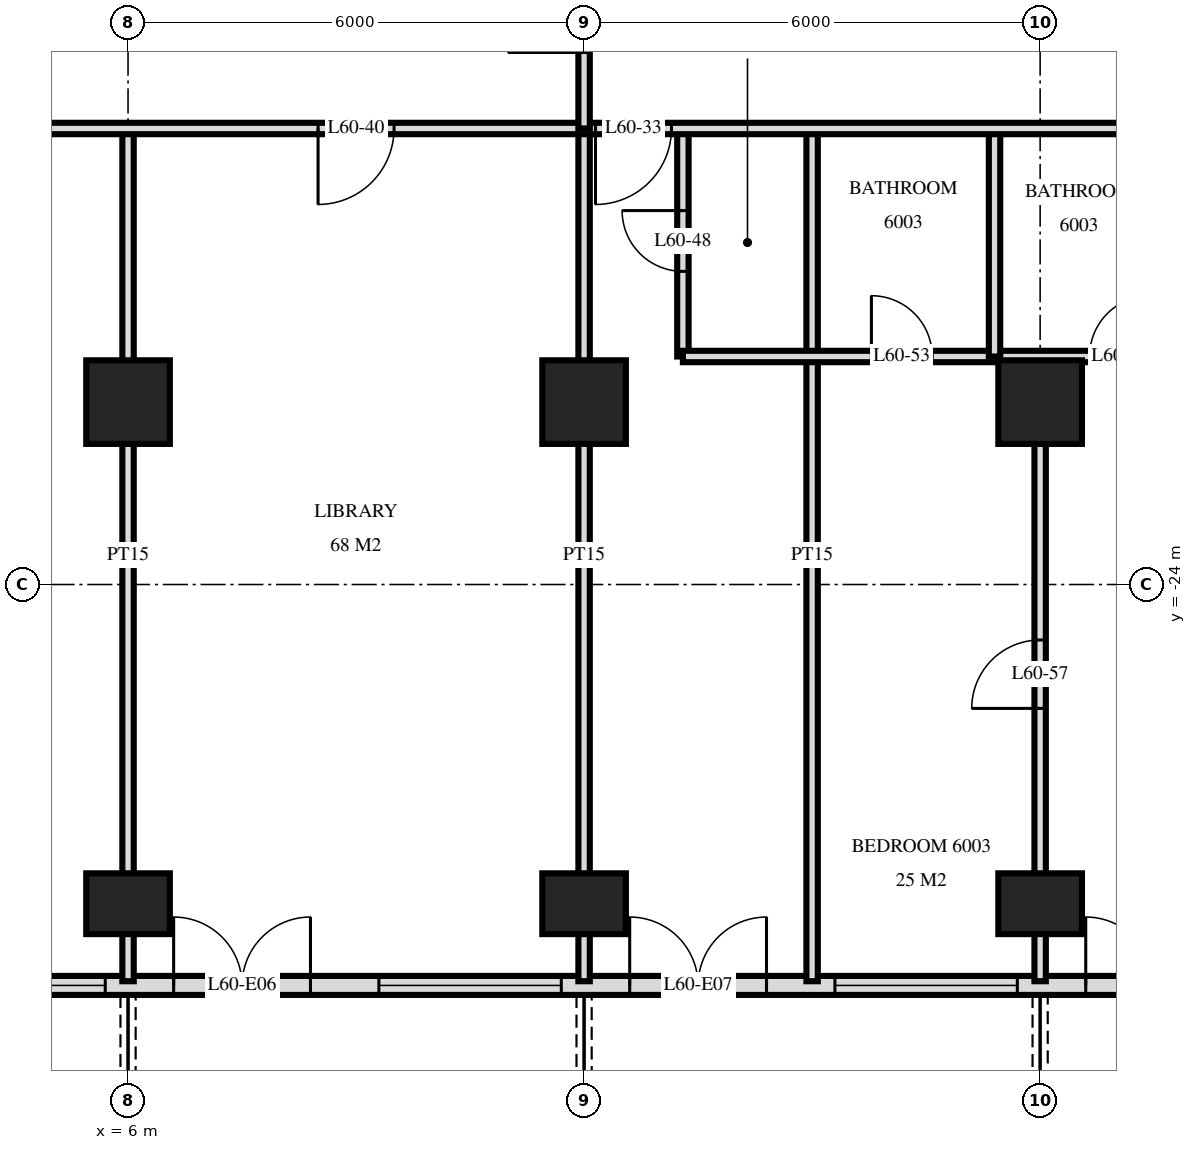
"""IFC4 building model, lengths in metres.
Left out: names, types, materials, properties, quantities, classifications, styles, units other than length and angle.
Written with IfcOpenShell. Run it as: python <this file> out.ifc"""

import sys

from ifc_helpers import new_model, si_unit, direction, frame, frame_2d, origin, origin_2d, place, context, subcontext, project, spatial, rectangle, extrude, element, fill, save


model = new_model("IFC4")
c1 = context("Model", 3, precision=1e-05, world=origin(), true_north=direction((0.0, 1.0)))
c2 = subcontext(c1, "Body", "Model", "MODEL_VIEW")
j1 = project(units=[si_unit("LENGTHUNIT", "METRE"), si_unit("PLANEANGLEUNIT", "RADIAN")], contexts=[c1])
p1 = place(None, origin())
s1 = spatial("IfcSite", under=j1, at=p1, CompositionType="ELEMENT")
p2 = place(p1, origin())
s2 = spatial("IfcBuilding", under=s1, at=p2, CompositionType="ELEMENT")
p3 = place(p2, frame((0.0, 0.0, 229.1)))
s3 = spatial("IfcBuildingStorey", under=s2, at=p3, CompositionType="ELEMENT", Elevation=229.1)
p4 = place(p3, frame((6.0, -28.2, 0.0), z_axis=(0.0, 0.0, 1.0), x_axis=(1.0, 0.0, 0.0)))
e1 = element("IfcColumn", 1, at=p4, inside=s3, PredefinedType="COLUMN", context=c2, shape_type="SweptSolid", body=[
    extrude(rectangle(XDim=1.1, YDim=0.8, at=origin_2d()), origin(), (0.0, 0.0, 1.0), 3.5),
])
p5 = place(p3, frame((6.0, -21.6, 0.0), z_axis=(0.0, 0.0, 1.0), x_axis=(1.0, 0.0, 0.0)))
e2 = element("IfcColumn", 2, at=p5, inside=s3, PredefinedType="COLUMN", context=c2, shape_type="SweptSolid", body=[
    extrude(rectangle(XDim=1.1, YDim=1.1, at=origin_2d()), origin(), (0.0, 0.0, 1.0), 3.5),
])
p6 = place(p3, frame((12.0, -28.2, 0.0), z_axis=(0.0, 0.0, 1.0), x_axis=(1.0, 0.0, 0.0)))
e3 = element("IfcColumn", 3, at=p6, inside=s3, PredefinedType="COLUMN", context=c2, shape_type="SweptSolid", body=[
    extrude(rectangle(XDim=1.1, YDim=0.8, at=origin_2d()), origin(), (0.0, 0.0, 1.0), 3.5),
])
p7 = place(p3, frame((12.0, -21.6, 0.0), z_axis=(0.0, 0.0, 1.0), x_axis=(1.0, 0.0, 0.0)))
e4 = element("IfcColumn", 4, at=p7, inside=s3, PredefinedType="COLUMN", context=c2, shape_type="SweptSolid", body=[
    extrude(rectangle(XDim=1.1, YDim=1.1, at=origin_2d()), origin(), (0.0, 0.0, 1.0), 3.5),
])
p8 = place(p3, frame((18.0, -28.2, 0.0), z_axis=(0.0, 0.0, 1.0), x_axis=(1.0, 0.0, 0.0)))
e5 = element("IfcColumn", 5, at=p8, inside=s3, PredefinedType="COLUMN", context=c2, shape_type="SweptSolid", body=[
    extrude(rectangle(XDim=1.1, YDim=0.8, at=origin_2d()), origin(), (0.0, 0.0, 1.0), 3.5),
])
p9 = place(p3, frame((18.0, -21.6, 0.0), z_axis=(0.0, 0.0, 1.0), x_axis=(1.0, 0.0, 0.0)))
e6 = element("IfcColumn", 6, at=p9, inside=s3, PredefinedType="COLUMN", context=c2, shape_type="SweptSolid", body=[
    extrude(rectangle(XDim=1.1, YDim=1.1, at=origin_2d()), origin(), (0.0, 0.0, 1.0), 3.5),
])
p10 = place(p3, frame((-22.475, -29.275, 0.0), z_axis=(0.0, 0.0, 1.0), x_axis=(1.0, 0.0, 0.0)))
e7 = element("IfcWall", 7, at=p10, inside=s3, PredefinedType="SOLIDWALL", context=c2, shape_type="SweptSolid", body=[
    extrude(rectangle(XDim=44.951, YDim=0.25, at=frame_2d((22.475, 0.0))), origin(), (0.0, 0.0, 1.0), 3.22),
])
p11 = place(p10, frame((0.575, 0.0, 0.0)))
e8 = element("IfcOpeningElement", 8, at=p11, cuts=e7, PredefinedType="OPENING", context=c2, shape_type="SweptSolid", body=[
    extrude(rectangle(XDim=1.8, YDim=2.4, at=frame_2d((0.9, 1.2))), frame((0.0, 0.135, 0.0), z_axis=(0.0, -1.0, 0.0), x_axis=(1.0, 0.0, 0.0)), (0.0, 0.0, 1.0), 0.27),
])
p12 = place(p10, frame((6.575, 0.0, 0.0)))
e9 = element("IfcOpeningElement", 9, at=p12, cuts=e7, PredefinedType="OPENING", context=c2, shape_type="SweptSolid", body=[
    extrude(rectangle(XDim=1.8, YDim=2.4, at=frame_2d((0.9, 1.2))), frame((0.0, 0.135, 0.0), z_axis=(0.0, -1.0, 0.0), x_axis=(1.0, 0.0, 0.0)), (0.0, 0.0, 1.0), 0.27),
])
p13 = place(p10, frame((11.075, 0.0, 0.0)))
e10 = element("IfcOpeningElement", 10, at=p13, cuts=e7, PredefinedType="OPENING", context=c2, shape_type="SweptSolid", body=[
    extrude(rectangle(XDim=1.8, YDim=2.4, at=frame_2d((0.9, 1.2))), frame((0.0, 0.135, 0.0), z_axis=(0.0, -1.0, 0.0), x_axis=(1.0, 0.0, 0.0)), (0.0, 0.0, 1.0), 0.27),
])
p14 = place(p10, frame((13.775, 0.0, 0.9)))
e11 = element("IfcOpeningElement", 11, at=p14, cuts=e7, PredefinedType="OPENING", context=c2, shape_type="SweptSolid", body=[
    extrude(rectangle(XDim=2.4, YDim=1.5, at=frame_2d((1.2, 0.75))), frame((0.0, 0.135, 0.0), z_axis=(0.0, -1.0, 0.0), x_axis=(1.0, 0.0, 0.0)), (0.0, 0.0, 1.0), 0.27),
])
p15 = place(p10, frame((16.775, 0.0, 0.9)))
e12 = element("IfcOpeningElement", 12, at=p15, cuts=e7, PredefinedType="OPENING", context=c2, shape_type="SweptSolid", body=[
    extrude(rectangle(XDim=2.4, YDim=1.5, at=frame_2d((1.2, 0.75))), frame((0.0, 0.135, 0.0), z_axis=(0.0, -1.0, 0.0), x_axis=(1.0, 0.0, 0.0)), (0.0, 0.0, 1.0), 0.27),
])
p16 = place(p10, frame((20.075, 0.0, 0.0)))
e13 = element("IfcOpeningElement", 13, at=p16, cuts=e7, PredefinedType="OPENING", context=c2, shape_type="SweptSolid", body=[
    extrude(rectangle(XDim=1.8, YDim=2.4, at=frame_2d((0.9, 1.2))), frame((0.0, 0.135, 0.0), z_axis=(0.0, -1.0, 0.0), x_axis=(1.0, 0.0, 0.0)), (0.0, 0.0, 1.0), 0.27),
])
p17 = place(p10, frame((23.075, 0.0, 0.0)))
e14 = element("IfcOpeningElement", 14, at=p17, cuts=e7, PredefinedType="OPENING", context=c2, shape_type="SweptSolid", body=[
    extrude(rectangle(XDim=1.8, YDim=2.4, at=frame_2d((0.9, 1.2))), frame((0.0, 0.135, 0.0), z_axis=(0.0, -1.0, 0.0), x_axis=(1.0, 0.0, 0.0)), (0.0, 0.0, 1.0), 0.27),
])
p18 = place(p10, frame((25.775, 0.0, 0.9)))
e15 = element("IfcOpeningElement", 15, at=p18, cuts=e7, PredefinedType="OPENING", context=c2, shape_type="SweptSolid", body=[
    extrude(rectangle(XDim=2.4, YDim=1.5, at=frame_2d((1.2, 0.75))), frame((0.0, 0.135, 0.0), z_axis=(0.0, -1.0, 0.0), x_axis=(1.0, 0.0, 0.0)), (0.0, 0.0, 1.0), 0.27),
])
p19 = place(p10, frame((29.075, 0.0, 0.0)))
e16 = element("IfcOpeningElement", 16, at=p19, cuts=e7, PredefinedType="OPENING", context=c2, shape_type="SweptSolid", body=[
    extrude(rectangle(XDim=1.8, YDim=2.4, at=frame_2d((0.9, 1.2))), frame((0.0, 0.135, 0.0), z_axis=(0.0, -1.0, 0.0), x_axis=(1.0, 0.0, 0.0)), (0.0, 0.0, 1.0), 0.27),
])
p20 = place(p10, frame((31.775, 0.0, 0.9)))
e17 = element("IfcOpeningElement", 17, at=p20, cuts=e7, PredefinedType="OPENING", context=c2, shape_type="SweptSolid", body=[
    extrude(rectangle(XDim=2.4, YDim=1.5, at=frame_2d((1.2, 0.75))), frame((0.0, 0.135, 0.0), z_axis=(0.0, -1.0, 0.0), x_axis=(1.0, 0.0, 0.0)), (0.0, 0.0, 1.0), 0.27),
])
p21 = place(p10, frame((35.075, 0.0, 0.0)))
e18 = element("IfcOpeningElement", 18, at=p21, cuts=e7, PredefinedType="OPENING", context=c2, shape_type="SweptSolid", body=[
    extrude(rectangle(XDim=1.8, YDim=2.4, at=frame_2d((0.9, 1.2))), frame((0.0, 0.135, 0.0), z_axis=(0.0, -1.0, 0.0), x_axis=(1.0, 0.0, 0.0)), (0.0, 0.0, 1.0), 0.27),
])
p22 = place(p10, frame((37.775, 0.0, 0.9)))
e19 = element("IfcOpeningElement", 19, at=p22, cuts=e7, PredefinedType="OPENING", context=c2, shape_type="SweptSolid", body=[
    extrude(rectangle(XDim=2.4, YDim=1.5, at=frame_2d((1.2, 0.75))), frame((0.0, 0.135, 0.0), z_axis=(0.0, -1.0, 0.0), x_axis=(1.0, 0.0, 0.0)), (0.0, 0.0, 1.0), 0.27),
])
p23 = place(p10, frame((41.075, 0.0, 0.0)))
e20 = element("IfcOpeningElement", 20, at=p23, cuts=e7, PredefinedType="OPENING", context=c2, shape_type="SweptSolid", body=[
    extrude(rectangle(XDim=1.8, YDim=2.4, at=frame_2d((0.9, 1.2))), frame((0.0, 0.135, 0.0), z_axis=(0.0, -1.0, 0.0), x_axis=(1.0, 0.0, 0.0)), (0.0, 0.0, 1.0), 0.27),
])
p24 = place(p3, frame((18.0, -29.22, 0.0), z_axis=(0.0, 0.0, 1.0), x_axis=(0.0, 1.0, 0.0)))
e21 = element("IfcWall", 21, at=p24, inside=s3, PredefinedType="PARTITIONING", context=c2, shape_type="SweptSolid", body=[
    extrude(rectangle(XDim=8.22, YDim=0.15, at=frame_2d((4.11, 0.0))), origin(), (0.0, 0.0, 1.0), 3.22),
])
p25 = place(p24, frame((3.59, 0.0, 0.0)))
e22 = element("IfcOpeningElement", 22, at=p25, cuts=e21, PredefinedType="OPENING", context=c2, shape_type="SweptSolid", body=[
    extrude(rectangle(XDim=0.9, YDim=2.1, at=frame_2d((0.45, 1.05))), frame((0.0, 0.085, 0.0), z_axis=(0.0, -1.0, 0.0), x_axis=(1.0, 0.0, 0.0)), (0.0, 0.0, 1.0), 0.17),
])
p26 = place(p3, frame((17.4, -21.0, 0.0), z_axis=(0.0, 0.0, 1.0), x_axis=(0.0, 1.0, 0.0)))
e23 = element("IfcWall", 23, at=p26, inside=s3, PredefinedType="PARTITIONING", context=c2, shape_type="SweptSolid", body=[
    extrude(rectangle(XDim=3.0, YDim=0.15, at=frame_2d((1.5, 0.0))), origin(), (0.0, 0.0, 1.0), 3.22),
])
p27 = place(p3, frame((15.0, -29.22, 0.0), z_axis=(0.0, 0.0, 1.0), x_axis=(0.0, 1.0, 0.0)))
e24 = element("IfcWall", 24, at=p27, inside=s3, PredefinedType="PARTITIONING", context=c2, shape_type="SweptSolid", body=[
    extrude(rectangle(XDim=11.22, YDim=0.15, at=frame_2d((5.61, 0.0))), origin(), (0.0, 0.0, 1.0), 3.22),
])
p28 = place(p3, frame((13.3, -21.0, 0.0), z_axis=(0.0, 0.0, 1.0), x_axis=(0.0, 1.0, 0.0)))
e25 = element("IfcWall", 25, at=p28, inside=s3, PredefinedType="PARTITIONING", context=c2, shape_type="SweptSolid", body=[
    extrude(rectangle(XDim=3.0, YDim=0.15, at=frame_2d((1.5, 0.0))), origin(), (0.0, 0.0, 1.0), 3.22),
])
p29 = place(p28, frame((1.12, 0.0, 0.0)))
e26 = element("IfcOpeningElement", 26, at=p29, cuts=e25, PredefinedType="OPENING", context=c2, shape_type="SweptSolid", body=[
    extrude(rectangle(XDim=0.8, YDim=2.1, at=frame_2d((0.4, 1.05))), frame((0.0, 0.085, 0.0), z_axis=(0.0, -1.0, 0.0), x_axis=(1.0, 0.0, 0.0)), (0.0, 0.0, 1.0), 0.17),
])
p30 = place(p3, frame((12.0, -18.0, 0.0), z_axis=(0.0, 0.0, 1.0), x_axis=(0.0, 1.0, 0.0)))
e27 = element("IfcWall", 27, at=p30, inside=s3, PredefinedType="PARTITIONING", context=c2, shape_type="SweptSolid", body=[
    extrude(rectangle(XDim=2.95, YDim=0.15, at=frame_2d((1.475, 0.0))), origin(), (0.0, 0.0, 1.0), 3.22),
])
p31 = place(p30, frame((1.0, 0.0, 0.0)))
e28 = element("IfcOpeningElement", 28, at=p31, cuts=e27, PredefinedType="OPENING", context=c2, shape_type="SweptSolid", body=[
    extrude(rectangle(XDim=1.0, YDim=2.1, at=frame_2d((0.5, 1.05))), frame((0.0, 0.085, 0.0), z_axis=(0.0, -1.0, 0.0), x_axis=(1.0, 0.0, 0.0)), (0.0, 0.0, 1.0), 0.17),
])
for number, where, z_axis, x_axis in (
    (29, (12.0, -29.22, 0.0), (0.0, 0.0, 1.0), (0.0, 1.0, 0.0)),
    (30, (6.0, -29.22, 0.0), (0.0, 0.0, 1.0), (0.0, 1.0, 0.0)),
):
    element("IfcWall", number, at=place(p3, frame(where, z_axis=z_axis, x_axis=x_axis)), inside=s3, PredefinedType="PARTITIONING", context=c2, shape_type="SweptSolid", body=[
        extrude(rectangle(XDim=11.22, YDim=0.15, at=frame_2d((5.61, 0.0))), origin(), (0.0, 0.0, 1.0), 3.22),
    ])
p32 = place(p3, frame((13.3, -21.0, 0.0), z_axis=(0.0, 0.0, 1.0), x_axis=(1.0, 0.0, 0.0)))
e31 = element("IfcWall", 31, at=p32, inside=s3, PredefinedType="PARTITIONING", context=c2, shape_type="SweptSolid", body=[
    extrude(rectangle(XDim=8.1, YDim=0.15, at=frame_2d((4.05, 0.0))), origin(), (0.0, 0.0, 1.0), 3.22),
])
p33 = place(p32, frame((2.48, 0.0, 0.0)))
e32 = element("IfcOpeningElement", 32, at=p33, cuts=e31, PredefinedType="OPENING", context=c2, shape_type="SweptSolid", body=[
    extrude(rectangle(XDim=0.8, YDim=2.1, at=frame_2d((0.4, 1.05))), frame((0.0, 0.085, 0.0), z_axis=(0.0, -1.0, 0.0), x_axis=(1.0, 0.0, 0.0)), (0.0, 0.0, 1.0), 0.17),
])
p34 = place(p32, frame((5.35, 0.0, 0.0)))
e33 = element("IfcOpeningElement", 33, at=p34, cuts=e31, PredefinedType="OPENING", context=c2, shape_type="SweptSolid", body=[
    extrude(rectangle(XDim=0.8, YDim=2.1, at=frame_2d((0.4, 1.05))), frame((0.0, 0.085, 0.0), z_axis=(0.0, -1.0, 0.0), x_axis=(1.0, 0.0, 0.0)), (0.0, 0.0, 1.0), 0.17),
])
p35 = place(p3, frame((-26.82, -18.0, 0.0), z_axis=(0.0, 0.0, 1.0), x_axis=(1.0, 0.0, 0.0)))
e34 = element("IfcWall", 34, at=p35, inside=s3, PredefinedType="PARTITIONING", context=c2, shape_type="SweptSolid", body=[
    extrude(rectangle(XDim=53.64, YDim=0.15, at=frame_2d((26.82, 0.0))), origin(), (0.0, 0.0, 1.0), 3.22),
])
p36 = place(p35, frame((11.32, 0.0, 0.0)))
e35 = element("IfcOpeningElement", 35, at=p36, cuts=e34, PredefinedType="OPENING", context=c2, shape_type="SweptSolid", body=[
    extrude(rectangle(XDim=1.0, YDim=2.1, at=frame_2d((0.5, 1.05))), frame((0.0, 0.085, 0.0), z_axis=(0.0, -1.0, 0.0), x_axis=(1.0, 0.0, 0.0)), (0.0, 0.0, 1.0), 0.17),
])
p37 = place(p35, frame((3.22, 0.0, 0.0)))
e36 = element("IfcOpeningElement", 36, at=p37, cuts=e34, PredefinedType="OPENING", context=c2, shape_type="SweptSolid", body=[
    extrude(rectangle(XDim=1.0, YDim=2.1, at=frame_2d((0.5, 1.05))), frame((0.0, 0.085, 0.0), z_axis=(0.0, -1.0, 0.0), x_axis=(1.0, 0.0, 0.0)), (0.0, 0.0, 1.0), 0.17),
])
p38 = place(p35, frame((5.02, 0.0, 0.0)))
e37 = element("IfcOpeningElement", 37, at=p38, cuts=e34, PredefinedType="OPENING", context=c2, shape_type="SweptSolid", body=[
    extrude(rectangle(XDim=1.0, YDim=2.1, at=frame_2d((0.5, 1.05))), frame((0.0, 0.085, 0.0), z_axis=(0.0, -1.0, 0.0), x_axis=(1.0, 0.0, 0.0)), (0.0, 0.0, 1.0), 0.17),
])
p39 = place(p35, frame((38.97, 0.0, 0.0)))
e38 = element("IfcOpeningElement", 38, at=p39, cuts=e34, PredefinedType="OPENING", context=c2, shape_type="SweptSolid", body=[
    extrude(rectangle(XDim=1.0, YDim=2.1, at=frame_2d((0.5, 1.05))), frame((0.0, 0.085, 0.0), z_axis=(0.0, -1.0, 0.0), x_axis=(1.0, 0.0, 0.0)), (0.0, 0.0, 1.0), 0.17),
])
p40 = place(p35, frame((48.72, 0.0, 0.0)))
e39 = element("IfcOpeningElement", 39, at=p40, cuts=e34, PredefinedType="OPENING", context=c2, shape_type="SweptSolid", body=[
    extrude(rectangle(XDim=1.0, YDim=2.1, at=frame_2d((0.5, 1.05))), frame((0.0, 0.085, 0.0), z_axis=(0.0, -1.0, 0.0), x_axis=(1.0, 0.0, 0.0)), (0.0, 0.0, 1.0), 0.17),
])
p41 = place(p35, frame((46.92, 0.0, 0.0)))
e40 = element("IfcOpeningElement", 40, at=p41, cuts=e34, PredefinedType="OPENING", context=c2, shape_type="SweptSolid", body=[
    extrude(rectangle(XDim=1.0, YDim=2.1, at=frame_2d((0.5, 1.05))), frame((0.0, 0.085, 0.0), z_axis=(0.0, -1.0, 0.0), x_axis=(1.0, 0.0, 0.0)), (0.0, 0.0, 1.0), 0.17),
])
p42 = place(p35, frame((18.82, 0.0, 0.0)))
e41 = element("IfcOpeningElement", 41, at=p42, cuts=e34, PredefinedType="OPENING", context=c2, shape_type="SweptSolid", body=[
    extrude(rectangle(XDim=1.0, YDim=2.1, at=frame_2d((0.5, 1.05))), frame((0.0, 0.085, 0.0), z_axis=(0.0, -1.0, 0.0), x_axis=(1.0, 0.0, 0.0)), (0.0, 0.0, 1.0), 0.17),
])
p43 = place(p35, frame((27.82, 0.0, 0.0)))
e42 = element("IfcOpeningElement", 42, at=p43, cuts=e34, PredefinedType="OPENING", context=c2, shape_type="SweptSolid", body=[
    extrude(rectangle(XDim=1.0, YDim=2.1, at=frame_2d((0.5, 1.05))), frame((0.0, 0.085, 0.0), z_axis=(0.0, -1.0, 0.0), x_axis=(1.0, 0.0, 0.0)), (0.0, 0.0, 1.0), 0.17),
])
p44 = place(p35, frame((35.32, 0.0, 0.0)))
e43 = element("IfcOpeningElement", 43, at=p44, cuts=e34, PredefinedType="OPENING", context=c2, shape_type="SweptSolid", body=[
    extrude(rectangle(XDim=1.0, YDim=2.1, at=frame_2d((0.5, 1.05))), frame((0.0, 0.085, 0.0), z_axis=(0.0, -1.0, 0.0), x_axis=(1.0, 0.0, 0.0)), (0.0, 0.0, 1.0), 0.17),
])
p45 = place(p18, origin())
e44 = element("IfcWindow", 44, at=p45, inside=s3, PartitioningType="SINGLE_PANEL", PredefinedType="WINDOW", context=c2, shape_type="SweptSolid", body=[
    extrude(rectangle(XDim=2.4, YDim=1.5, at=frame_2d((1.2, 0.75))), frame((0.0, 0.03, 0.0), z_axis=(0.0, -1.0, 0.0), x_axis=(1.0, 0.0, 0.0)), (0.0, 0.0, 1.0), 0.06),
])
fill(e15, e44)
p46 = place(p19, origin())
e45 = element("IfcDoor", 45, at=p46, inside=s3, OperationType="DOUBLE_DOOR_SINGLE_SWING", PredefinedType="DOOR", context=c2, shape_type="SweptSolid", body=[
    extrude(rectangle(XDim=1.8, YDim=2.4, at=frame_2d((0.9, 1.2))), frame((0.0, 0.025, 0.0), z_axis=(0.0, -1.0, 0.0), x_axis=(1.0, 0.0, 0.0)), (0.0, 0.0, 1.0), 0.05),
])
fill(e16, e45)
p47 = place(p20, origin())
e46 = element("IfcWindow", 46, at=p47, inside=s3, PartitioningType="SINGLE_PANEL", PredefinedType="WINDOW", context=c2, shape_type="SweptSolid", body=[
    extrude(rectangle(XDim=2.4, YDim=1.5, at=frame_2d((1.2, 0.75))), frame((0.0, 0.03, 0.0), z_axis=(0.0, -1.0, 0.0), x_axis=(1.0, 0.0, 0.0)), (0.0, 0.0, 1.0), 0.06),
])
fill(e17, e46)
p48 = place(p21, origin())
e47 = element("IfcDoor", 47, at=p48, inside=s3, OperationType="DOUBLE_DOOR_SINGLE_SWING", PredefinedType="DOOR", context=c2, shape_type="SweptSolid", body=[
    extrude(rectangle(XDim=1.8, YDim=2.4, at=frame_2d((0.9, 1.2))), frame((0.0, 0.025, 0.0), z_axis=(0.0, -1.0, 0.0), x_axis=(1.0, 0.0, 0.0)), (0.0, 0.0, 1.0), 0.05),
])
fill(e18, e47)
p49 = place(p22, origin())
e48 = element("IfcWindow", 48, at=p49, inside=s3, PartitioningType="SINGLE_PANEL", PredefinedType="WINDOW", context=c2, shape_type="SweptSolid", body=[
    extrude(rectangle(XDim=2.4, YDim=1.5, at=frame_2d((1.2, 0.75))), frame((0.0, 0.03, 0.0), z_axis=(0.0, -1.0, 0.0), x_axis=(1.0, 0.0, 0.0)), (0.0, 0.0, 1.0), 0.06),
])
fill(e19, e48)
p50 = place(p23, origin())
e49 = element("IfcDoor", 49, at=p50, inside=s3, OperationType="DOUBLE_DOOR_SINGLE_SWING", PredefinedType="DOOR", context=c2, shape_type="SweptSolid", body=[
    extrude(rectangle(XDim=1.8, YDim=2.4, at=frame_2d((0.9, 1.2))), frame((0.0, 0.025, 0.0), z_axis=(0.0, -1.0, 0.0), x_axis=(1.0, 0.0, 0.0)), (0.0, 0.0, 1.0), 0.05),
])
fill(e20, e49)
p51 = place(p39, frame((0.5, 0.0, 0.0), z_axis=(0.0, 0.0, 1.0), x_axis=(-1.0, 0.0, 0.0)))
e50 = element("IfcDoor", 50, at=p51, inside=s3, OperationType="SINGLE_SWING_LEFT", PredefinedType="DOOR", context=c2, shape_type="SweptSolid", body=[
    extrude(rectangle(XDim=1.0, YDim=2.1, at=frame_2d((0.0, 1.05))), frame((0.0, -0.025, 0.0), z_axis=(0.0, 1.0, 0.0), x_axis=(-1.0, 0.0, 0.0)), (0.0, 0.0, 1.0), 0.05),
])
fill(e38, e50)
p52 = place(p44, frame((0.5, 0.0, 0.0), z_axis=(0.0, 0.0, 1.0), x_axis=(-1.0, 0.0, 0.0)))
e51 = element("IfcDoor", 51, at=p52, inside=s3, OperationType="SINGLE_SWING_LEFT", PredefinedType="DOOR", context=c2, shape_type="SweptSolid", body=[
    extrude(rectangle(XDim=1.0, YDim=2.1, at=frame_2d((0.0, 1.05))), frame((0.0, -0.025, 0.0), z_axis=(0.0, 1.0, 0.0), x_axis=(-1.0, 0.0, 0.0)), (0.0, 0.0, 1.0), 0.05),
])
fill(e43, e51)
p53 = place(p29, origin())
e52 = element("IfcDoor", 52, at=p53, inside=s3, OperationType="SINGLE_SWING_LEFT", PredefinedType="DOOR", context=c2, shape_type="SweptSolid", body=[
    extrude(rectangle(XDim=0.8, YDim=2.1, at=frame_2d((0.4, 1.05))), frame((0.0, 0.025, 0.0), z_axis=(0.0, -1.0, 0.0), x_axis=(1.0, 0.0, 0.0)), (0.0, 0.0, 1.0), 0.05),
])
fill(e26, e52)
p54 = place(p33, origin())
e53 = element("IfcDoor", 53, at=p54, inside=s3, OperationType="SINGLE_SWING_RIGHT", PredefinedType="DOOR", context=c2, shape_type="SweptSolid", body=[
    extrude(rectangle(XDim=0.8, YDim=2.1, at=frame_2d((0.4, 1.05))), frame((0.0, 0.025, 0.0), z_axis=(0.0, -1.0, 0.0), x_axis=(1.0, 0.0, 0.0)), (0.0, 0.0, 1.0), 0.05),
])
fill(e32, e53)
p55 = place(p34, origin())
e54 = element("IfcDoor", 54, at=p55, inside=s3, OperationType="SINGLE_SWING_LEFT", PredefinedType="DOOR", context=c2, shape_type="SweptSolid", body=[
    extrude(rectangle(XDim=0.8, YDim=2.1, at=frame_2d((0.4, 1.05))), frame((0.0, 0.025, 0.0), z_axis=(0.0, -1.0, 0.0), x_axis=(1.0, 0.0, 0.0)), (0.0, 0.0, 1.0), 0.05),
])
fill(e33, e54)
p56 = place(p25, origin())
e55 = element("IfcDoor", 55, at=p56, inside=s3, OperationType="SINGLE_SWING_RIGHT", PredefinedType="DOOR", context=c2, shape_type="SweptSolid", body=[
    extrude(rectangle(XDim=0.9, YDim=2.1, at=frame_2d((0.45, 1.05))), frame((0.0, 0.025, 0.0), z_axis=(0.0, -1.0, 0.0), x_axis=(1.0, 0.0, 0.0)), (0.0, 0.0, 1.0), 0.05),
])
fill(e22, e55)
save(model, sys.argv[1])
